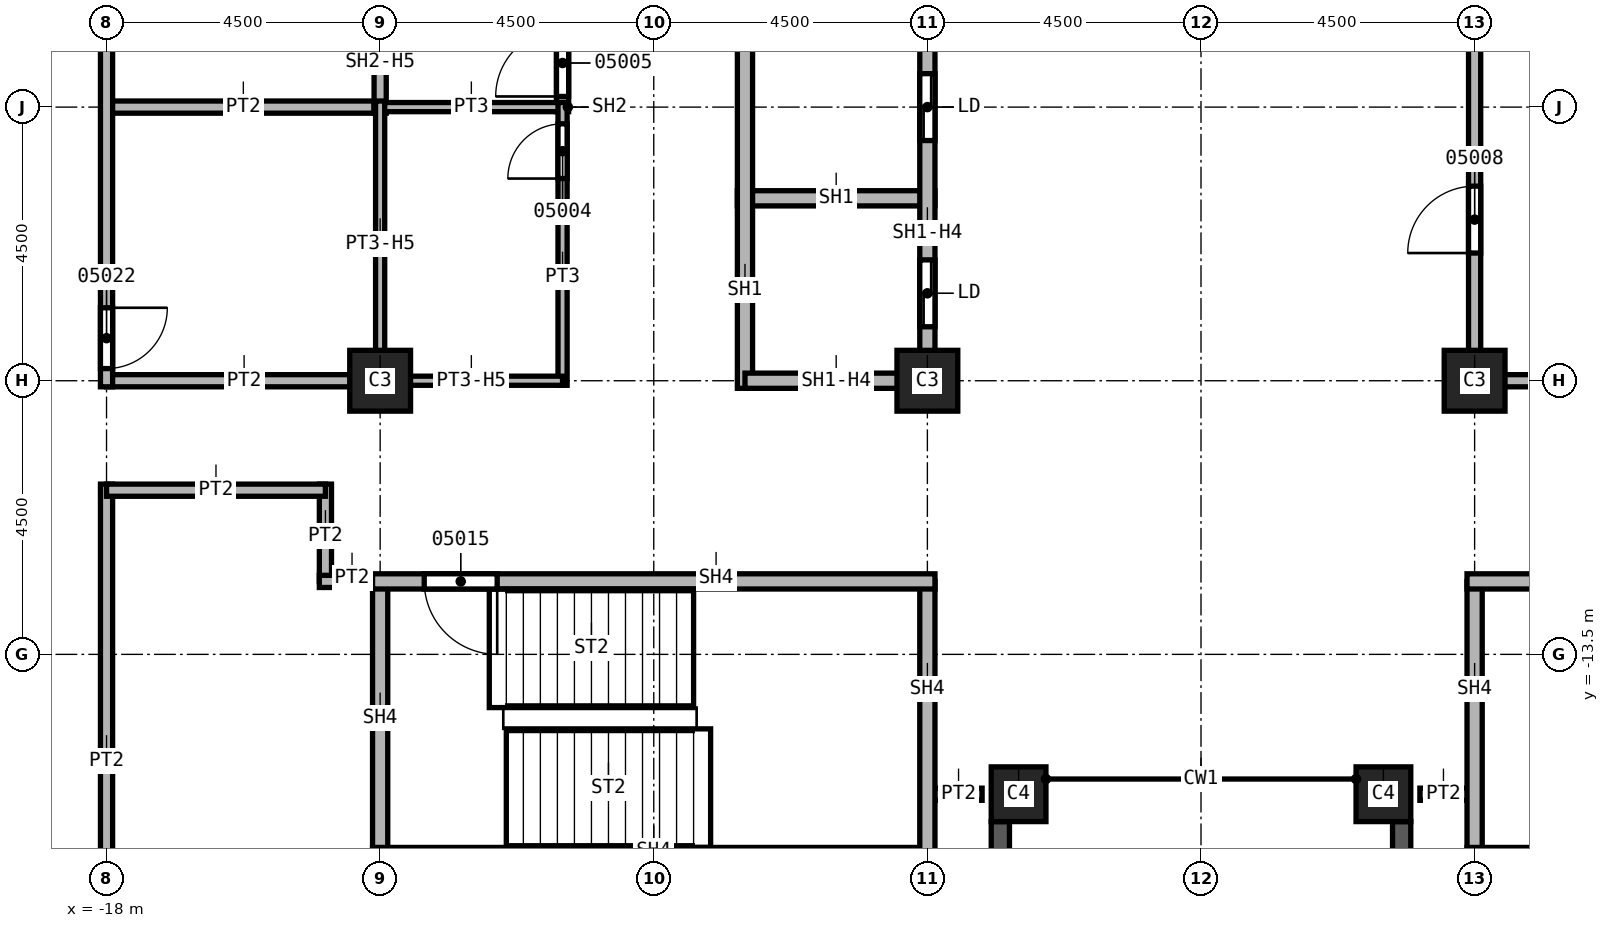
"""IFC4 building model, lengths in metres.
Left out: names, types, materials, properties, quantities, classifications, styles, units other than length and angle.
Written with IfcOpenShell. Run it as: python <this file> out.ifc"""

import sys

from ifc_helpers import new_model, si_unit, direction, frame, frame_2d, origin, origin_2d, place, context, subcontext, project, spatial, rectangle, extrude, element, fill, save


model = new_model("IFC4")
c1 = context("Model", 3, precision=1e-05, world=origin(), true_north=direction((0.0, 1.0)))
c2 = subcontext(c1, "Body", "Model", "MODEL_VIEW")
j1 = project(units=[si_unit("LENGTHUNIT", "METRE"), si_unit("PLANEANGLEUNIT", "RADIAN")], contexts=[c1])
p1 = place(None, origin())
s1 = spatial("IfcSite", under=j1, at=p1, CompositionType="ELEMENT")
p2 = place(p1, origin())
s2 = spatial("IfcBuilding", under=s1, at=p2, CompositionType="ELEMENT")
p3 = place(p2, frame((0.0, 0.0, 116.0)))
s3 = spatial("IfcBuildingStorey", under=s2, at=p3, CompositionType="ELEMENT", Elevation=116.0)
for number, where, z_axis, x_axis in (
    (1, (4.5, -9.0, 0.0), (0.0, 0.0, 1.0), (1.0, 0.0, 0.0)),
    (2, (-4.5, -9.0, 0.0), (0.0, 0.0, 1.0), (1.0, 0.0, 0.0)),
    (3, (-13.5, -9.0, 0.0), (0.0, 0.0, 1.0), (1.0, 0.0, 0.0)),
):
    element("IfcColumn", number, at=place(p3, frame(where, z_axis=z_axis, x_axis=x_axis)), inside=s3, PredefinedType="COLUMN", context=c2, shape_type="SweptSolid", body=[
        extrude(rectangle(XDim=1.0, YDim=1.0, at=origin_2d()), origin(), (0.0, 0.0, 1.0), 3.6),
    ])
for number, where, z_axis, x_axis in (
    (4, (3.0, -15.8, 0.0), (0.0, 0.0, 1.0), (1.0, 0.0, 0.0)),
    (5, (-3.0, -15.8, 0.0), (0.0, 0.0, 1.0), (1.0, 0.0, 0.0)),
):
    element("IfcColumn", number, at=place(p3, frame(where, z_axis=z_axis, x_axis=x_axis)), inside=s3, PredefinedType="COLUMN", context=c2, shape_type="SweptSolid", body=[
        extrude(rectangle(XDim=0.9, YDim=0.9, at=origin_2d()), origin(), (0.0, 0.0, 1.0), 3.6),
    ])
p4 = place(p3, frame((-3.3, -24.2, 0.0), z_axis=(0.0, 0.0, 1.0), x_axis=(0.0, 1.0, 0.0)))
e6 = element("IfcWall", 6, at=p4, inside=s3, PredefinedType="SOLIDWALL", context=c2, shape_type="SweptSolid", body=[
    extrude(rectangle(XDim=7.95, YDim=0.3, at=frame_2d((3.975, 0.0))), origin(), (0.0, 0.0, 1.0), 3.0),
])
p5 = place(p4, frame((0.788, 0.0, 0.8)))
e7 = element("IfcOpeningElement", 7, at=p5, cuts=e6, PredefinedType="OPENING", context=c2, shape_type="SweptSolid", body=[
    extrude(rectangle(XDim=2.4, YDim=1.95, at=frame_2d((1.2, 0.975))), frame((0.0, 0.15, 0.0), z_axis=(0.0, -1.0, 0.0), x_axis=(1.0, 0.0, 0.0)), (0.0, 0.0, 1.0), 0.3),
])
p6 = place(p4, frame((4.762, 0.0, 0.8)))
e8 = element("IfcOpeningElement", 8, at=p6, cuts=e6, PredefinedType="OPENING", context=c2, shape_type="SweptSolid", body=[
    extrude(rectangle(XDim=2.4, YDim=1.95, at=frame_2d((1.2, 0.975))), frame((0.0, 0.15, 0.0), z_axis=(0.0, -1.0, 0.0), x_axis=(1.0, 0.0, 0.0)), (0.0, 0.0, 1.0), 0.3),
])
p7 = place(p3, frame((3.3, -16.25, 0.0), z_axis=(0.0, 0.0, 1.0), x_axis=(0.0, -1.0, 0.0)))
e9 = element("IfcWall", 9, at=p7, inside=s3, PredefinedType="SOLIDWALL", context=c2, shape_type="SweptSolid", body=[
    extrude(rectangle(XDim=7.95, YDim=0.3, at=frame_2d((3.975, 0.0))), origin(), (0.0, 0.0, 1.0), 3.0),
])
p8 = place(p7, frame((0.788, 0.0, 0.8)))
e10 = element("IfcOpeningElement", 10, at=p8, cuts=e9, PredefinedType="OPENING", context=c2, shape_type="SweptSolid", body=[
    extrude(rectangle(XDim=2.4, YDim=1.95, at=frame_2d((1.2, 0.975))), frame((0.0, 0.15, 0.0), z_axis=(0.0, -1.0, 0.0), x_axis=(1.0, 0.0, 0.0)), (0.0, 0.0, 1.0), 0.3),
])
p9 = place(p7, frame((4.762, 0.0, 0.8)))
e11 = element("IfcOpeningElement", 11, at=p9, cuts=e9, PredefinedType="OPENING", context=c2, shape_type="SweptSolid", body=[
    extrude(rectangle(XDim=2.4, YDim=1.95, at=frame_2d((1.2, 0.975))), frame((0.0, 0.15, 0.0), z_axis=(0.0, -1.0, 0.0), x_axis=(1.0, 0.0, 0.0)), (0.0, 0.0, 1.0), 0.3),
])
p10 = place(p3, frame((-18.0, -10.7, 0.0), z_axis=(0.0, 0.0, 1.0), x_axis=(0.0, -1.0, 0.0)))
e12 = element("IfcWall", 12, at=p10, inside=s3, PredefinedType="PARTITIONING", context=c2, shape_type="SweptSolid", body=[
    extrude(rectangle(XDim=13.5, YDim=0.2, at=frame_2d((6.75, 0.0))), origin(), (0.0, 0.0, 1.0), 3.6),
])
p11 = place(p10, frame((8.9, 0.0, 0.0)))
e13 = element("IfcOpeningElement", 13, at=p11, cuts=e12, PredefinedType="OPENING", context=c2, shape_type="SweptSolid", body=[
    extrude(rectangle(XDim=1.0, YDim=2.1, at=frame_2d((0.5, 1.05))), frame((0.0, 0.1, 0.0), z_axis=(0.0, -1.0, 0.0), x_axis=(1.0, 0.0, 0.0)), (0.0, 0.0, 1.0), 0.2),
])
for number, where, z_axis, x_axis in (
    (14, (-18.0, -9.0, 0.0), (0.0, 0.0, 1.0), (1.0, 0.0, 0.0)),
    (15, (-18.0, -4.5, 0.0), (0.0, 0.0, 1.0), (1.0, 0.0, 0.0)),
):
    element("IfcWall", number, at=place(p3, frame(where, z_axis=z_axis, x_axis=x_axis)), inside=s3, PredefinedType="PARTITIONING", context=c2, shape_type="SweptSolid", body=[
        extrude(rectangle(XDim=4.5, YDim=0.2, at=frame_2d((2.25, 0.0))), origin(), (0.0, 0.0, 1.0), 3.6),
    ])
p12 = place(p3, frame((-18.0, 9.1, 0.0), z_axis=(0.0, 0.0, 1.0), x_axis=(0.0, -1.0, 0.0)))
e16 = element("IfcWall", 16, at=p12, inside=s3, PredefinedType="PARTITIONING", context=c2, shape_type="SweptSolid", body=[
    extrude(rectangle(XDim=18.2, YDim=0.2, at=frame_2d((9.1, 0.0))), origin(), (0.0, 0.0, 1.0), 3.6),
])
p13 = place(p12, frame((16.9, 0.0, 0.0)))
e17 = element("IfcOpeningElement", 17, at=p13, cuts=e16, PredefinedType="OPENING", context=c2, shape_type="SweptSolid", body=[
    extrude(rectangle(XDim=1.0, YDim=2.1, at=frame_2d((0.5, 1.05))), frame((0.0, 0.1, 0.0), z_axis=(0.0, -1.0, 0.0), x_axis=(1.0, 0.0, 0.0)), (0.0, 0.0, 1.0), 0.2),
])
p14 = place(p12, frame((7.3, 0.0, 0.0)))
e18 = element("IfcOpeningElement", 18, at=p14, cuts=e16, PredefinedType="OPENING", context=c2, shape_type="SweptSolid", body=[
    extrude(rectangle(XDim=1.0, YDim=2.1, at=frame_2d((0.5, 1.05))), frame((0.0, 0.1, 0.0), z_axis=(0.0, -1.0, 0.0), x_axis=(1.0, 0.0, 0.0)), (0.0, 0.0, 1.0), 0.2),
])
p15 = place(p3, frame((-14.4, -12.3, 0.0), z_axis=(0.0, 0.0, 1.0), x_axis=(0.0, 1.0, 0.0)))
e19 = element("IfcWall", 19, at=p15, inside=s3, PredefinedType="PARTITIONING", context=c2, shape_type="SweptSolid", body=[
    extrude(rectangle(XDim=1.6, YDim=0.2, at=frame_2d((0.8, 0.0))), origin(), (0.0, 0.0, 1.0), 3.6),
])
p16 = place(p3, frame((-14.4, -10.8, 0.0), z_axis=(0.0, 0.0, 1.0), x_axis=(-1.0, 0.0, 0.0)))
e20 = element("IfcWall", 20, at=p16, inside=s3, PredefinedType="PARTITIONING", context=c2, shape_type="SweptSolid", body=[
    extrude(rectangle(XDim=3.6, YDim=0.2, at=frame_2d((1.8, 0.0))), origin(), (0.0, 0.0, 1.0), 3.6),
])
p17 = place(p3, frame((-13.375, -12.3, 0.0), z_axis=(0.0, 0.0, 1.0), x_axis=(-1.0, 0.0, 0.0)))
e21 = element("IfcWall", 21, at=p17, inside=s3, PredefinedType="PARTITIONING", context=c2, shape_type="SweptSolid", body=[
    extrude(rectangle(XDim=1.125, YDim=0.2, at=frame_2d((0.562, 0.0))), origin(), (0.0, 0.0, 1.0), 3.6),
])
for number, where, z_axis, x_axis in (
    (22, (-3.6, -15.8, 0.0), (0.0, 0.0, 1.0), (-1.0, 0.0, 0.0)),
    (23, (4.5, -15.8, 0.0), (0.0, 0.0, 1.0), (-1.0, 0.0, 0.0)),
):
    element("IfcWall", number, at=place(p3, frame(where, z_axis=z_axis, x_axis=x_axis)), inside=s3, PredefinedType="PARTITIONING", context=c2, shape_type="SweptSolid", body=[
        extrude(rectangle(XDim=0.9, YDim=0.2, at=frame_2d((0.45, 0.0))), origin(), (0.0, 0.0, 1.0), 3.6),
    ])
p18 = place(p3, frame((-13.5, -4.6, 0.0), z_axis=(0.0, 0.0, 1.0), x_axis=(0.0, 1.0, 0.0)))
e24 = element("IfcWall", 24, at=p18, inside=s3, PredefinedType="SOLIDWALL", context=c2, shape_type="SweptSolid", body=[
    extrude(rectangle(XDim=1.6, YDim=0.2, at=frame_2d((0.8, 0.0))), origin(), (0.0, 0.0, 1.0), 2.838),
])
p19 = place(p3, frame((-10.5, -4.575, 0.0), z_axis=(0.0, 0.0, 1.0), x_axis=(0.0, 1.0, 0.0)))
e25 = element("IfcWall", 25, at=p19, inside=s3, PredefinedType="SOLIDWALL", context=c2, shape_type="SweptSolid", body=[
    extrude(rectangle(XDim=1.7, YDim=0.2, at=frame_2d((0.85, 0.0))), origin(), (0.0, 0.0, 1.0), 3.6),
])
p20 = place(p19, frame((0.25, 0.0, 0.0)))
e26 = element("IfcOpeningElement", 26, at=p20, cuts=e25, PredefinedType="OPENING", context=c2, shape_type="SweptSolid", body=[
    extrude(rectangle(XDim=1.1, YDim=2.1, at=frame_2d((0.55, 1.05))), frame((0.0, 0.1, 0.0), z_axis=(0.0, -1.0, 0.0), x_axis=(1.0, 0.0, 0.0)), (0.0, 0.0, 1.0), 0.2),
])
p21 = place(p3, frame((4.5, -9.1, 0.0), z_axis=(0.0, 0.0, 1.0), x_axis=(0.0, 1.0, 0.0)))
e27 = element("IfcWall", 27, at=p21, inside=s3, PredefinedType="SOLIDWALL", context=c2, shape_type="SweptSolid", body=[
    extrude(rectangle(XDim=9.1, YDim=0.2, at=frame_2d((4.55, 0.0))), origin(), (0.0, 0.0, 1.0), 2.838),
])
p22 = place(p21, frame((2.2, 0.0, 0.0)))
e28 = element("IfcOpeningElement", 28, at=p22, cuts=e27, PredefinedType="OPENING", context=c2, shape_type="SweptSolid", body=[
    extrude(rectangle(XDim=1.1, YDim=2.1, at=frame_2d((0.55, 1.05))), frame((0.0, 0.1, 0.0), z_axis=(0.0, -1.0, 0.0), x_axis=(1.0, 0.0, 0.0)), (0.0, 0.0, 1.0), 0.2),
])
p23 = place(p3, frame((7.5, -9.0, 0.0), z_axis=(0.0, 0.0, 1.0), x_axis=(-1.0, 0.0, 0.0)))
e29 = element("IfcWall", 29, at=p23, inside=s3, PredefinedType="SOLIDWALL", context=c2, shape_type="SweptSolid", body=[
    extrude(rectangle(XDim=3.0, YDim=0.2, at=frame_2d((1.5, 0.0))), origin(), (0.0, 0.0, 1.0), 2.838),
])
p24 = place(p3, frame((-7.625, -6.0, 0.0), z_axis=(0.0, 0.0, 1.0), x_axis=(1.0, 0.0, 0.0)))
e30 = element("IfcWall", 30, at=p24, inside=s3, PredefinedType="SOLIDWALL", context=c2, shape_type="SweptSolid", body=[
    extrude(rectangle(XDim=3.25, YDim=0.25, at=frame_2d((1.625, 0.0))), origin(), (0.0, 0.0, 1.0), 3.6),
])
p25 = place(p3, frame((-7.5, -9.125, 0.0), z_axis=(0.0, 0.0, 1.0), x_axis=(0.0, 1.0, 0.0)))
e31 = element("IfcWall", 31, at=p25, inside=s3, PredefinedType="SOLIDWALL", context=c2, shape_type="SweptSolid", body=[
    extrude(rectangle(XDim=12.25, YDim=0.25, at=frame_2d((6.125, 0.0))), origin(), (0.0, 0.0, 1.0), 3.6),
])
p26 = place(p3, frame((-4.5, -9.0, 0.0), z_axis=(0.0, 0.0, 1.0), x_axis=(-1.0, 0.0, 0.0)))
e32 = element("IfcWall", 32, at=p26, inside=s3, PredefinedType="SOLIDWALL", context=c2, shape_type="SweptSolid", body=[
    extrude(rectangle(XDim=3.0, YDim=0.25, at=frame_2d((1.5, 0.0))), origin(), (0.0, 0.0, 1.0), 2.838),
])
p27 = place(p3, frame((-4.5, 0.0, 0.0), z_axis=(0.0, 0.0, 1.0), x_axis=(0.0, -1.0, 0.0)))
e33 = element("IfcWall", 33, at=p27, inside=s3, PredefinedType="SOLIDWALL", context=c2, shape_type="SweptSolid", body=[
    extrude(rectangle(XDim=9.125, YDim=0.25, at=frame_2d((4.562, 0.0))), origin(), (0.0, 0.0, 1.0), 2.838),
])
p28 = place(p27, frame((7.012, 0.0, 0.0)))
e34 = element("IfcOpeningElement", 34, at=p28, cuts=e33, PredefinedType="OPENING", context=c2, shape_type="SweptSolid", body=[
    extrude(rectangle(XDim=1.1, YDim=2.1, at=frame_2d((0.55, 1.05))), frame((0.0, 0.125, 0.0), z_axis=(0.0, -1.0, 0.0), x_axis=(1.0, 0.0, 0.0)), (0.0, 0.0, 1.0), 0.25),
])
p29 = place(p27, frame((3.95, 0.0, 0.0)))
e35 = element("IfcOpeningElement", 35, at=p29, cuts=e33, PredefinedType="OPENING", context=c2, shape_type="SweptSolid", body=[
    extrude(rectangle(XDim=1.1, YDim=2.1, at=frame_2d((0.55, 1.05))), frame((0.0, 0.125, 0.0), z_axis=(0.0, -1.0, 0.0), x_axis=(1.0, 0.0, 0.0)), (0.0, 0.0, 1.0), 0.25),
])
p30 = place(p27, frame((0.95, 0.0, 0.0)))
e36 = element("IfcOpeningElement", 36, at=p30, cuts=e33, PredefinedType="OPENING", context=c2, shape_type="SweptSolid", body=[
    extrude(rectangle(XDim=1.1, YDim=2.1, at=frame_2d((0.55, 1.05))), frame((0.0, 0.125, 0.0), z_axis=(0.0, -1.0, 0.0), x_axis=(1.0, 0.0, 0.0)), (0.0, 0.0, 1.0), 0.25),
])
p31 = place(p3, frame((-13.5, -16.8, 0.0), z_axis=(0.0, 0.0, 1.0), x_axis=(0.0, 1.0, 0.0)))
e37 = element("IfcWall", 37, at=p31, inside=s3, PredefinedType="SOLIDWALL", context=c2, shape_type="SweptSolid", body=[
    extrude(rectangle(XDim=4.5, YDim=0.25, at=frame_2d((2.25, 0.0))), origin(), (0.0, 0.0, 1.0), 3.6),
])
p32 = place(p3, frame((-4.5, -16.8, 0.0), z_axis=(0.0, 0.0, 1.0), x_axis=(-1.0, 0.0, 0.0)))
e38 = element("IfcWall", 38, at=p32, inside=s3, PredefinedType="SOLIDWALL", context=c2, shape_type="SweptSolid", body=[
    extrude(rectangle(XDim=9.125, YDim=0.25, at=frame_2d((4.562, 0.0))), origin(), (0.0, 0.0, 1.0), 3.6),
])
p33 = place(p3, frame((-4.5, -12.3, 0.0), z_axis=(0.0, 0.0, 1.0), x_axis=(0.0, -1.0, 0.0)))
e39 = element("IfcWall", 39, at=p33, inside=s3, PredefinedType="SOLIDWALL", context=c2, shape_type="SweptSolid", body=[
    extrude(rectangle(XDim=4.625, YDim=0.25, at=frame_2d((2.312, 0.0))), origin(), (0.0, 0.0, 1.0), 3.6),
])
p34 = place(p3, frame((-4.375, -12.3, 0.0), z_axis=(0.0, 0.0, 1.0), x_axis=(-1.0, 0.0, 0.0)))
e40 = element("IfcWall", 40, at=p34, inside=s3, PredefinedType="SOLIDWALL", context=c2, shape_type="SweptSolid", body=[
    extrude(rectangle(XDim=9.25, YDim=0.25, at=frame_2d((4.625, 0.0))), origin(), (0.0, 0.0, 1.0), 3.6),
])
p35 = place(p34, frame((7.2, 0.0, 0.0)))
e41 = element("IfcOpeningElement", 41, at=p35, cuts=e40, PredefinedType="OPENING", context=c2, shape_type="SweptSolid", body=[
    extrude(rectangle(XDim=1.2, YDim=2.1, at=frame_2d((0.6, 1.05))), frame((0.0, 0.125, 0.0), z_axis=(0.0, -1.0, 0.0), x_axis=(1.0, 0.0, 0.0)), (0.0, 0.0, 1.0), 0.25),
])
p36 = place(p3, frame((4.5, -16.8, 0.0), z_axis=(0.0, 0.0, 1.0), x_axis=(0.0, 1.0, 0.0)))
e42 = element("IfcWall", 42, at=p36, inside=s3, PredefinedType="SOLIDWALL", context=c2, shape_type="SweptSolid", body=[
    extrude(rectangle(XDim=4.5, YDim=0.25, at=frame_2d((2.25, 0.0))), origin(), (0.0, 0.0, 1.0), 3.6),
])
p37 = place(p3, frame((13.5, -16.8, 0.0), z_axis=(0.0, 0.0, 1.0), x_axis=(-1.0, 0.0, 0.0)))
e43 = element("IfcWall", 43, at=p37, inside=s3, PredefinedType="SOLIDWALL", context=c2, shape_type="SweptSolid", body=[
    extrude(rectangle(XDim=9.125, YDim=0.25, at=frame_2d((4.562, 0.0))), origin(), (0.0, 0.0, 1.0), 3.6),
])
p38 = place(p3, frame((13.625, -12.3, 0.0), z_axis=(0.0, 0.0, 1.0), x_axis=(-1.0, 0.0, 0.0)))
e44 = element("IfcWall", 44, at=p38, inside=s3, PredefinedType="SOLIDWALL", context=c2, shape_type="SweptSolid", body=[
    extrude(rectangle(XDim=9.25, YDim=0.25, at=frame_2d((4.625, 0.0))), origin(), (0.0, 0.0, 1.0), 3.6),
])
p39 = place(p38, frame((0.85, 0.0, 0.0)))
e45 = element("IfcOpeningElement", 45, at=p39, cuts=e44, PredefinedType="OPENING", context=c2, shape_type="SweptSolid", body=[
    extrude(rectangle(XDim=1.2, YDim=2.1, at=frame_2d((0.6, 1.05))), frame((0.0, 0.125, 0.0), z_axis=(0.0, -1.0, 0.0), x_axis=(1.0, 0.0, 0.0)), (0.0, 0.0, 1.0), 0.25),
])
p40 = place(p3, frame((-13.6, -4.5, 0.0), z_axis=(0.0, 0.0, 1.0), x_axis=(1.0, 0.0, 0.0)))
e46 = element("IfcWall", 46, at=p40, inside=s3, PredefinedType="PARTITIONING", context=c2, shape_type="SweptSolid", body=[
    extrude(rectangle(XDim=3.1, YDim=0.15, at=frame_2d((1.55, 0.0))), origin(), (0.0, 0.0, 1.0), 3.6),
])
p41 = place(p3, frame((-13.5, -9.1, 0.0), z_axis=(0.0, 0.0, 1.0), x_axis=(0.0, 1.0, 0.0)))
e47 = element("IfcWall", 47, at=p41, inside=s3, PredefinedType="PARTITIONING", context=c2, shape_type="SweptSolid", body=[
    extrude(rectangle(XDim=4.7, YDim=0.15, at=frame_2d((2.35, 0.0))), origin(), (0.0, 0.0, 1.0), 2.838),
])
p42 = place(p3, frame((-10.5, -9.075, 0.0), z_axis=(0.0, 0.0, 1.0), x_axis=(0.0, 1.0, 0.0)))
e48 = element("IfcWall", 48, at=p42, inside=s3, PredefinedType="PARTITIONING", context=c2, shape_type="SweptSolid", body=[
    extrude(rectangle(XDim=4.65, YDim=0.15, at=frame_2d((2.325, 0.0))), origin(), (0.0, 0.0, 1.0), 3.6),
])
p43 = place(p42, frame((3.4, 0.0, 0.0)))
e49 = element("IfcOpeningElement", 49, at=p43, cuts=e48, PredefinedType="OPENING", context=c2, shape_type="SweptSolid", body=[
    extrude(rectangle(XDim=0.9, YDim=2.1, at=frame_2d((0.45, 1.05))), frame((0.0, 0.075, 0.0), z_axis=(0.0, -1.0, 0.0), x_axis=(1.0, 0.0, 0.0)), (0.0, 0.0, 1.0), 0.15),
])
p44 = place(p3, frame((-10.5, -9.0, 0.0), z_axis=(0.0, 0.0, 1.0), x_axis=(-1.0, 0.0, 0.0)))
e50 = element("IfcWall", 50, at=p44, inside=s3, PredefinedType="PARTITIONING", context=c2, shape_type="SweptSolid", body=[
    extrude(rectangle(XDim=3.075, YDim=0.15, at=frame_2d((1.538, 0.0))), origin(), (0.0, 0.0, 1.0), 2.838),
])
p45 = place(p43, origin())
e51 = element("IfcDoor", 51, at=p45, inside=s3, OperationType="SINGLE_SWING_LEFT", PredefinedType="DOOR", context=c2, shape_type="SweptSolid", body=[
    extrude(rectangle(XDim=0.9, YDim=2.1, at=frame_2d((0.45, 1.05))), frame((0.0, 0.025, 0.0), z_axis=(0.0, -1.0, 0.0), x_axis=(1.0, 0.0, 0.0)), (0.0, 0.0, 1.0), 0.05),
])
fill(e49, e51)
p46 = place(p20, origin())
e52 = element("IfcDoor", 52, at=p46, inside=s3, OperationType="SINGLE_SWING_RIGHT", PredefinedType="DOOR", context=c2, shape_type="SweptSolid", body=[
    extrude(rectangle(XDim=1.1, YDim=2.1, at=frame_2d((0.55, 1.05))), frame((0.0, 0.025, 0.0), z_axis=(0.0, -1.0, 0.0), x_axis=(1.0, 0.0, 0.0)), (0.0, 0.0, 1.0), 0.05),
])
fill(e26, e52)
p47 = place(p22, origin())
e53 = element("IfcDoor", 53, at=p47, inside=s3, OperationType="SINGLE_SWING_LEFT", PredefinedType="DOOR", context=c2, shape_type="SweptSolid", body=[
    extrude(rectangle(XDim=1.1, YDim=2.1, at=frame_2d((0.55, 1.05))), frame((0.0, 0.025, 0.0), z_axis=(0.0, -1.0, 0.0), x_axis=(1.0, 0.0, 0.0)), (0.0, 0.0, 1.0), 0.05),
])
fill(e28, e53)
p48 = place(p35, origin())
e54 = element("IfcDoor", 54, at=p48, inside=s3, OperationType="SINGLE_SWING_RIGHT", PredefinedType="DOOR", context=c2, shape_type="SweptSolid", body=[
    extrude(rectangle(XDim=1.2, YDim=2.1, at=frame_2d((0.6, 1.05))), frame((0.0, 0.025, 0.0), z_axis=(0.0, -1.0, 0.0), x_axis=(1.0, 0.0, 0.0)), (0.0, 0.0, 1.0), 0.05),
])
fill(e41, e54)
p49 = place(p13, origin())
e55 = element("IfcDoor", 55, at=p49, inside=s3, OperationType="SINGLE_SWING_LEFT", PredefinedType="DOOR", context=c2, shape_type="SweptSolid", body=[
    extrude(rectangle(XDim=1.0, YDim=2.1, at=frame_2d((0.5, 1.05))), frame((0.0, 0.025, 0.0), z_axis=(0.0, -1.0, 0.0), x_axis=(1.0, 0.0, 0.0)), (0.0, 0.0, 1.0), 0.05),
])
fill(e17, e55)
p50 = place(p28, origin())
e56 = element("IfcDoor", 56, at=p50, inside=s3, OperationType="SLIDING_TO_LEFT", PredefinedType="DOOR", context=c2, shape_type="SweptSolid", body=[
    extrude(rectangle(XDim=1.1, YDim=2.1, at=frame_2d((0.55, 1.05))), frame((0.0, 0.025, 0.0), z_axis=(0.0, -1.0, 0.0), x_axis=(1.0, 0.0, 0.0)), (0.0, 0.0, 1.0), 0.05),
])
fill(e34, e56)
p51 = place(p29, origin())
e57 = element("IfcDoor", 57, at=p51, inside=s3, OperationType="SLIDING_TO_LEFT", PredefinedType="DOOR", context=c2, shape_type="SweptSolid", body=[
    extrude(rectangle(XDim=1.1, YDim=2.1, at=frame_2d((0.55, 1.05))), frame((0.0, 0.025, 0.0), z_axis=(0.0, -1.0, 0.0), x_axis=(1.0, 0.0, 0.0)), (0.0, 0.0, 1.0), 0.05),
])
fill(e35, e57)
save(model, sys.argv[1])
